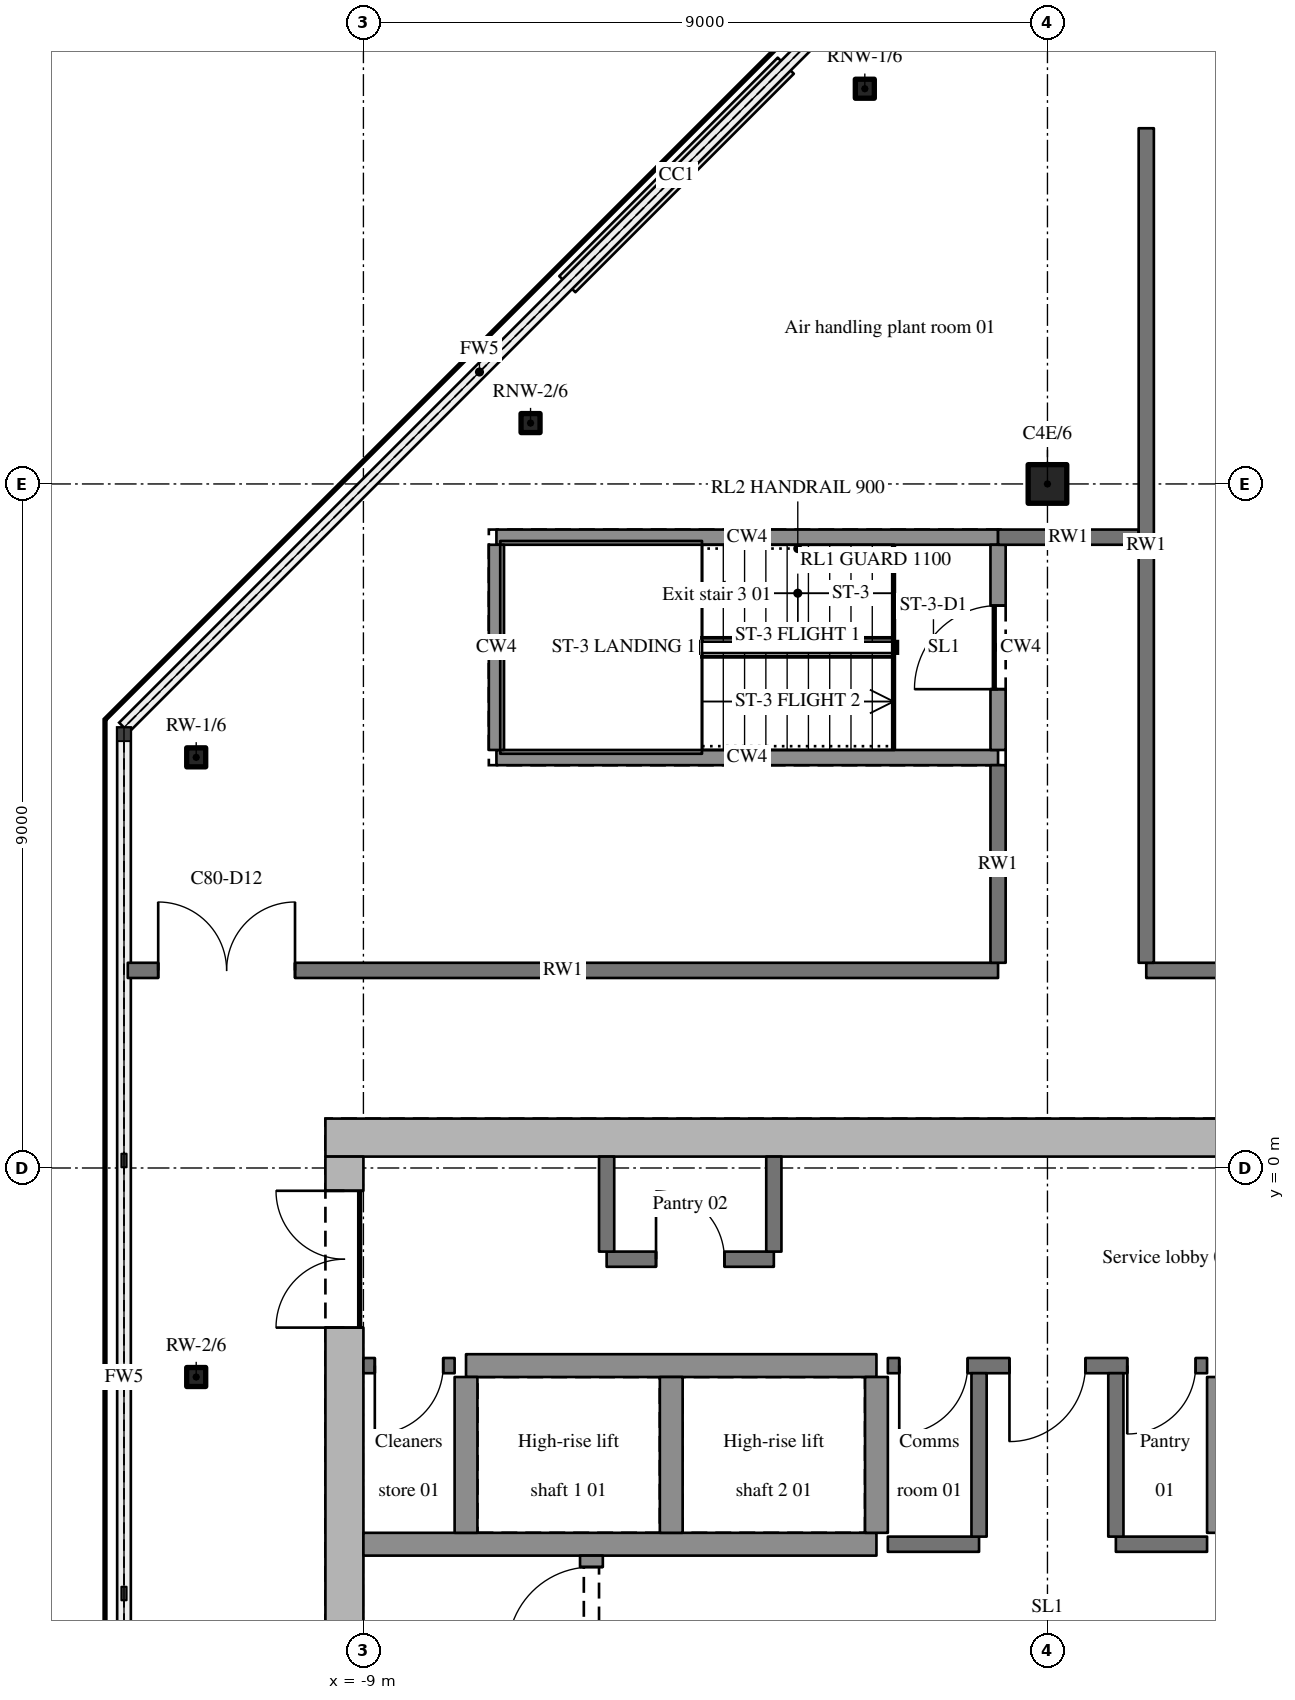
"""IFC4 building model, lengths in metres.
Left out: names, types, materials, properties, quantities, classifications, styles, units other than length and angle.
Written with IfcOpenShell. Run it as: python <this file> out.ifc"""

import sys

from ifc_helpers import new_model, si_unit, direction, frame, frame_2d, origin, origin_2d, place, context, subcontext, project, spatial, polyline, rectangle, hollow_rectangle, hollow_circle, outline, extrude, element, fill, save


model = new_model("IFC4")
c1 = context("Model", 3, precision=1e-05, world=origin(), true_north=direction((0.0, 1.0)))
c2 = subcontext(c1, "Body", "Model", "MODEL_VIEW")
j1 = project(units=[si_unit("LENGTHUNIT", "METRE"), si_unit("PLANEANGLEUNIT", "RADIAN")], contexts=[c1])
p1 = place(None, origin())
s1 = spatial("IfcSite", under=j1, at=p1, CompositionType="ELEMENT")
p2 = place(p1, origin())
s2 = spatial("IfcBuilding", under=s1, at=p2, CompositionType="ELEMENT")
p3 = place(p2, frame((0.0, 0.0, 297.3)))
s3 = spatial("IfcBuildingStorey", under=s2, at=p3, CompositionType="ELEMENT", Elevation=297.3)
p4 = place(p3, frame((0.0, 9.0, 0.0), z_axis=(0.0, 0.0, 1.0), x_axis=(1.0, 0.0, 0.0)))
e1 = element("IfcColumn", 1, at=p4, inside=s3, PredefinedType="COLUMN", context=c2, shape_type="SweptSolid", body=[
    extrude(hollow_circle(Radius=0.254, WallThickness=0.025, at=origin_2d()), origin(), (0.0, 0.0, 1.0), 3.6),
])
p5 = place(p3, frame((-2.403, 14.2, 0.0), z_axis=(0.0, 0.0, 1.0), x_axis=(1.0, 0.0, 0.0)))
e2 = element("IfcColumn", 2, at=p5, inside=s3, PredefinedType="COLUMN", context=c2, shape_type="SweptSolid", body=[
    extrude(hollow_rectangle(XDim=0.25, YDim=0.25, WallThickness=0.02, InnerFilletRadius=0.03, OuterFilletRadius=0.05, at=origin_2d()), origin(), (0.0, 0.0, 1.0), 3.114),
])
for number, where, z_axis, x_axis in (
    (3, (-6.801, 9.801, 0.0), (0.0, 0.0, 1.0), (1.0, 0.0, 0.0)),
    (4, (-11.2, 5.403, 0.0), (0.0, 0.0, 1.0), (1.0, 0.0, 0.0)),
    (5, (-11.2, -2.75, 0.0), (0.0, 0.0, 1.0), (1.0, 0.0, 0.0)),
):
    element("IfcColumn", number, at=place(p3, frame(where, z_axis=z_axis, x_axis=x_axis)), inside=s3, PredefinedType="COLUMN", context=c2, shape_type="SweptSolid", body=[
        extrude(hollow_rectangle(XDim=0.25, YDim=0.25, WallThickness=0.02, InnerFilletRadius=0.03, OuterFilletRadius=0.05, at=origin_2d()), origin(), (0.0, 0.0, 1.0), 3.6),
    ])
p6 = place(p3, frame((-9.5, 0.4, 0.0), z_axis=(0.0, 0.0, 1.0), x_axis=(1.0, 0.0, 0.0)))
e6 = element("IfcWall", 6, at=p6, inside=s3, PredefinedType="SHEAR", context=c2, shape_type="SweptSolid", body=[
    extrude(outline(polyline([(0.0, 0.0), (19.0, 0.0), (19.0, 3.6), (0.0, 3.6), (0.0, 0.0)])), frame((0.0, 0.25, 0.0), z_axis=(0.0, -1.0, 0.0), x_axis=(1.0, 0.0, 0.0)), (0.0, 0.0, 1.0), 0.5),
])
p7 = place(p3, frame((-9.25, -11.5, 0.0), z_axis=(0.0, 0.0, 1.0), x_axis=(0.0, 1.0, 0.0)))
e7 = element("IfcWall", 7, at=p7, inside=s3, PredefinedType="SHEAR", context=c2, shape_type="SweptSolid", body=[
    extrude(outline(polyline([(0.0, 0.0), (11.65, 0.0), (11.65, 3.6), (0.0, 3.6), (0.0, 0.0)])), frame((0.0, 0.25, 0.0), z_axis=(0.0, -1.0, 0.0), x_axis=(1.0, 0.0, 0.0)), (0.0, 0.0, 1.0), 0.5),
])
p8 = place(p7, frame((9.4, 0.0, 0.0)))
e8 = element("IfcOpeningElement", 8, at=p8, cuts=e7, PredefinedType="OPENING", context=c2, shape_type="SweptSolid", body=[
    extrude(rectangle(XDim=1.8, YDim=2.1, at=frame_2d((0.9, 1.05))), frame((0.0, 0.26, 0.0), z_axis=(0.0, -1.0, 0.0), x_axis=(1.0, 0.0, 0.0)), (0.0, 0.0, 1.0), 0.52),
])
p9 = place(p3, frame((-9.0, -4.95, 0.0), z_axis=(0.0, 0.0, 1.0), x_axis=(1.0, 0.0, 0.0)))
e9 = element("IfcWall", 9, at=p9, inside=s3, PredefinedType="SHEAR", context=c2, shape_type="SweptSolid", body=[
    extrude(rectangle(XDim=6.75, YDim=0.3, at=frame_2d((3.375, 0.0))), origin(), (0.0, 0.0, 1.0), 3.6),
])
for number, where, z_axis, x_axis in (
    (10, (-2.1, -4.95, 0.0), (0.0, 0.0, 1.0), (1.0, 0.0, 0.0)),
    (11, (0.9, -4.95, 0.0), (0.0, 0.0, 1.0), (1.0, 0.0, 0.0)),
):
    element("IfcWall", number, at=place(p3, frame(where, z_axis=z_axis, x_axis=x_axis)), inside=s3, PredefinedType="SOLIDWALL", context=c2, shape_type="SweptSolid", body=[
        extrude(rectangle(XDim=1.2, YDim=0.2, at=frame_2d((0.6, 0.0))), origin(), (0.0, 0.0, 1.0), 3.3),
    ])
p10 = place(p3, frame((-7.8, -2.6, 0.0), z_axis=(0.0, 0.0, 1.0), x_axis=(-1.0, 0.0, 0.0)))
e12 = element("IfcWall", 12, at=p10, inside=s3, PredefinedType="SOLIDWALL", context=c2, shape_type="SweptSolid", body=[
    extrude(rectangle(XDim=1.2, YDim=0.2, at=frame_2d((0.6, 0.0))), origin(), (0.0, 0.0, 1.0), 3.3),
])
p11 = place(p10, frame((0.15, 0.0, 0.0)))
e13 = element("IfcOpeningElement", 13, at=p11, cuts=e12, PredefinedType="OPENING", context=c2, shape_type="SweptSolid", body=[
    extrude(rectangle(XDim=0.9, YDim=2.1, at=frame_2d((0.45, 1.05))), frame((0.0, 0.11, 0.0), z_axis=(0.0, -1.0, 0.0), x_axis=(1.0, 0.0, 0.0)), (0.0, 0.0, 1.0), 0.22),
])
p12 = place(p3, frame((-7.65, -2.6, 0.0), z_axis=(0.0, 0.0, 1.0), x_axis=(1.0, 0.0, 0.0)))
e14 = element("IfcWall", 14, at=p12, inside=s3, PredefinedType="SHEAR", context=c2, shape_type="SweptSolid", body=[
    extrude(rectangle(XDim=5.4, YDim=0.3, at=frame_2d((2.7, 0.0))), origin(), (0.0, 0.0, 1.0), 3.6),
])
p13 = place(p3, frame((2.1, -2.6, 0.0), z_axis=(0.0, 0.0, 1.0), x_axis=(-1.0, 0.0, 0.0)))
e15 = element("IfcWall", 15, at=p13, inside=s3, PredefinedType="SOLIDWALL", context=c2, shape_type="SweptSolid", body=[
    extrude(rectangle(XDim=4.2, YDim=0.2, at=frame_2d((2.1, 0.0))), origin(), (0.0, 0.0, 1.0), 3.3),
])
p14 = place(p13, frame((1.6, 0.0, 0.0)))
e16 = element("IfcOpeningElement", 16, at=p14, cuts=e15, PredefinedType="OPENING", context=c2, shape_type="SweptSolid", body=[
    extrude(rectangle(XDim=1.0, YDim=2.1, at=frame_2d((0.5, 1.05))), frame((0.0, 0.11, 0.0), z_axis=(0.0, -1.0, 0.0), x_axis=(1.0, 0.0, 0.0)), (0.0, 0.0, 1.0), 0.22),
])
p15 = place(p13, frame((3.15, 0.0, 0.0)))
e17 = element("IfcOpeningElement", 17, at=p15, cuts=e15, PredefinedType="OPENING", context=c2, shape_type="SweptSolid", body=[
    extrude(rectangle(XDim=0.9, YDim=2.1, at=frame_2d((0.45, 1.05))), frame((0.0, 0.11, 0.0), z_axis=(0.0, -1.0, 0.0), x_axis=(1.0, 0.0, 0.0)), (0.0, 0.0, 1.0), 0.22),
])
p16 = place(p13, frame((0.15, 0.0, 0.0)))
e18 = element("IfcOpeningElement", 18, at=p16, cuts=e15, PredefinedType="OPENING", context=c2, shape_type="SweptSolid", body=[
    extrude(rectangle(XDim=0.9, YDim=2.1, at=frame_2d((0.45, 1.05))), frame((0.0, 0.11, 0.0), z_axis=(0.0, -1.0, 0.0), x_axis=(1.0, 0.0, 0.0)), (0.0, 0.0, 1.0), 0.22),
])
p17 = place(p3, frame((-5.8, -1.2, 0.0), z_axis=(0.0, 0.0, 1.0), x_axis=(1.0, 0.0, 0.0)))
e19 = element("IfcWall", 19, at=p17, inside=s3, PredefinedType="SOLIDWALL", context=c2, shape_type="SweptSolid", body=[
    extrude(rectangle(XDim=2.2, YDim=0.2, at=frame_2d((1.1, 0.0))), origin(), (0.0, 0.0, 1.0), 3.3),
])
p18 = place(p17, frame((0.65, 0.0, 0.0)))
e20 = element("IfcOpeningElement", 20, at=p18, cuts=e19, PredefinedType="OPENING", context=c2, shape_type="SweptSolid", body=[
    extrude(rectangle(XDim=0.9, YDim=2.1, at=frame_2d((0.45, 1.05))), frame((0.0, 0.11, 0.0), z_axis=(0.0, -1.0, 0.0), x_axis=(1.0, 0.0, 0.0)), (0.0, 0.0, 1.0), 0.22),
])
p19 = place(p3, frame((-12.1, 2.6, 0.0), z_axis=(0.0, 0.0, 1.0), x_axis=(1.0, 0.0, 0.0)))
e21 = element("IfcWall", 21, at=p19, inside=s3, PredefinedType="SOLIDWALL", context=c2, shape_type="SweptSolid", body=[
    extrude(rectangle(XDim=11.45, YDim=0.2, at=frame_2d((5.725, 0.0))), origin(), (0.0, 0.0, 1.0), 2.66),
])
p20 = place(p19, frame((0.4, 0.0, 0.0)))
e22 = element("IfcOpeningElement", 22, at=p20, cuts=e21, PredefinedType="OPENING", context=c2, shape_type="SweptSolid", body=[
    extrude(rectangle(XDim=1.8, YDim=2.1, at=frame_2d((0.9, 1.05))), frame((0.0, 0.11, 0.0), z_axis=(0.0, -1.0, 0.0), x_axis=(1.0, 0.0, 0.0)), (0.0, 0.0, 1.0), 0.22),
])
p21 = place(p3, frame((1.3, 2.6, 0.0), z_axis=(0.0, 0.0, 1.0), x_axis=(1.0, 0.0, 0.0)))
e23 = element("IfcWall", 23, at=p21, inside=s3, PredefinedType="SOLIDWALL", context=c2, shape_type="SweptSolid", body=[
    extrude(rectangle(XDim=16.8, YDim=0.2, at=frame_2d((8.4, 0.0))), origin(), (0.0, 0.0, 1.0), 2.66),
])
p22 = place(p21, frame((1.9, 0.0, 0.0)))
e24 = element("IfcOpeningElement", 24, at=p22, cuts=e23, PredefinedType="OPENING", context=c2, shape_type="SweptSolid", body=[
    extrude(rectangle(XDim=0.9, YDim=2.1, at=frame_2d((0.45, 1.05))), frame((0.0, 0.11, 0.0), z_axis=(0.0, -1.0, 0.0), x_axis=(1.0, 0.0, 0.0)), (0.0, 0.0, 1.0), 0.22),
])
p23 = place(p21, frame((6.0, 0.0, 0.0)))
e25 = element("IfcOpeningElement", 25, at=p23, cuts=e23, PredefinedType="OPENING", context=c2, shape_type="SweptSolid", body=[
    extrude(rectangle(XDim=0.9, YDim=2.1, at=frame_2d((0.45, 1.05))), frame((0.0, 0.11, 0.0), z_axis=(0.0, -1.0, 0.0), x_axis=(1.0, 0.0, 0.0)), (0.0, 0.0, 1.0), 0.22),
])
p24 = place(p21, frame((13.025, 0.0, 0.0)))
e26 = element("IfcOpeningElement", 26, at=p24, cuts=e23, PredefinedType="OPENING", context=c2, shape_type="SweptSolid", body=[
    extrude(rectangle(XDim=0.9, YDim=2.1, at=frame_2d((0.45, 1.05))), frame((0.0, 0.11, 0.0), z_axis=(0.0, -1.0, 0.0), x_axis=(1.0, 0.0, 0.0)), (0.0, 0.0, 1.0), 0.22),
])
for number, where, z_axis, x_axis in (
    (27, (-7.25, 5.4, 0.0), (0.0, 0.0, 1.0), (1.0, 0.0, 0.0)),
    (28, (-7.25, 8.3, 0.0), (0.0, 0.0, 1.0), (1.0, 0.0, 0.0)),
):
    element("IfcWall", number, at=place(p3, frame(where, z_axis=z_axis, x_axis=x_axis)), inside=s3, PredefinedType="SHEAR", context=c2, shape_type="SweptSolid", body=[
        extrude(rectangle(XDim=6.6, YDim=0.2, at=frame_2d((3.3, 0.0))), origin(), (0.0, 0.0, 1.0), 3.6),
    ])
p25 = place(p3, frame((-0.65, 8.3, 0.0), z_axis=(0.0, 0.0, 1.0), x_axis=(1.0, 0.0, 0.0)))
e29 = element("IfcWall", 29, at=p25, inside=s3, PredefinedType="SOLIDWALL", context=c2, shape_type="SweptSolid", body=[
    extrude(rectangle(XDim=1.85, YDim=0.2, at=frame_2d((0.925, 0.0))), origin(), (0.0, 0.0, 1.0), 2.66),
])
p26 = place(p3, frame((-7.65, -4.8, 0.0), z_axis=(0.0, 0.0, 1.0), x_axis=(0.0, 1.0, 0.0)))
e30 = element("IfcWall", 30, at=p26, inside=s3, PredefinedType="SHEAR", context=c2, shape_type="SweptSolid", body=[
    extrude(rectangle(XDim=2.05, YDim=0.3, at=frame_2d((1.025, 0.0))), origin(), (0.0, 0.0, 1.0), 3.6),
])
p27 = place(p3, frame((-7.25, 5.5, 0.0), z_axis=(0.0, 0.0, 1.0), x_axis=(0.0, 1.0, 0.0)))
e31 = element("IfcWall", 31, at=p27, inside=s3, PredefinedType="SHEAR", context=c2, shape_type="SweptSolid", body=[
    extrude(rectangle(XDim=2.7, YDim=0.2, at=frame_2d((1.35, 0.0))), origin(), (0.0, 0.0, 1.0), 3.6),
])
p28 = place(p3, frame((-6.0, -11.5, 0.0), z_axis=(0.0, 0.0, 1.0), x_axis=(0.0, 1.0, 0.0)))
e32 = element("IfcWall", 32, at=p28, inside=s3, PredefinedType="SHEAR", context=c2, shape_type="SweptSolid", body=[
    extrude(rectangle(XDim=6.4, YDim=0.3, at=frame_2d((3.2, 0.0))), origin(), (0.0, 0.0, 1.0), 3.6),
])
p29 = place(p28, frame((5.15, 0.0, 0.0)))
e33 = element("IfcOpeningElement", 33, at=p29, cuts=e32, PredefinedType="OPENING", context=c2, shape_type="SweptSolid", body=[
    extrude(rectangle(XDim=1.1, YDim=2.1, at=frame_2d((0.55, 1.05))), frame((0.0, 0.16, 0.0), z_axis=(0.0, -1.0, 0.0), x_axis=(1.0, 0.0, 0.0)), (0.0, 0.0, 1.0), 0.32),
])
p30 = place(p3, frame((-5.8, -1.1, 0.0), z_axis=(0.0, 0.0, 1.0), x_axis=(0.0, 1.0, 0.0)))
e34 = element("IfcWall", 34, at=p30, inside=s3, PredefinedType="SOLIDWALL", context=c2, shape_type="SweptSolid", body=[
    extrude(rectangle(XDim=1.25, YDim=0.2, at=frame_2d((0.625, 0.0))), origin(), (0.0, 0.0, 1.0), 3.3),
])
p31 = place(p3, frame((-4.95, -4.8, 0.0), z_axis=(0.0, 0.0, 1.0), x_axis=(0.0, 1.0, 0.0)))
e35 = element("IfcWall", 35, at=p31, inside=s3, PredefinedType="SHEAR", context=c2, shape_type="SweptSolid", body=[
    extrude(rectangle(XDim=2.05, YDim=0.3, at=frame_2d((1.025, 0.0))), origin(), (0.0, 0.0, 1.0), 3.6),
])
p32 = place(p3, frame((-3.6, -1.1, 0.0), z_axis=(0.0, 0.0, 1.0), x_axis=(0.0, 1.0, 0.0)))
e36 = element("IfcWall", 36, at=p32, inside=s3, PredefinedType="SOLIDWALL", context=c2, shape_type="SweptSolid", body=[
    extrude(rectangle(XDim=1.25, YDim=0.2, at=frame_2d((0.625, 0.0))), origin(), (0.0, 0.0, 1.0), 3.3),
])
p33 = place(p3, frame((-2.25, -4.8, 0.0), z_axis=(0.0, 0.0, 1.0), x_axis=(0.0, 1.0, 0.0)))
e37 = element("IfcWall", 37, at=p33, inside=s3, PredefinedType="SHEAR", context=c2, shape_type="SweptSolid", body=[
    extrude(rectangle(XDim=2.05, YDim=0.3, at=frame_2d((1.025, 0.0))), origin(), (0.0, 0.0, 1.0), 3.6),
])
p34 = place(p3, frame((-0.9, -4.85, 0.0), z_axis=(0.0, 0.0, 1.0), x_axis=(0.0, 1.0, 0.0)))
e38 = element("IfcWall", 38, at=p34, inside=s3, PredefinedType="SOLIDWALL", context=c2, shape_type="SweptSolid", body=[
    extrude(rectangle(XDim=2.15, YDim=0.2, at=frame_2d((1.075, 0.0))), origin(), (0.0, 0.0, 1.0), 3.3),
])
p35 = place(p3, frame((-0.65, 2.7, 0.0), z_axis=(0.0, 0.0, 1.0), x_axis=(0.0, 1.0, 0.0)))
e39 = element("IfcWall", 39, at=p35, inside=s3, PredefinedType="SOLIDWALL", context=c2, shape_type="SweptSolid", body=[
    extrude(rectangle(XDim=2.6, YDim=0.2, at=frame_2d((1.3, 0.0))), origin(), (0.0, 0.0, 1.0), 2.66),
])
p36 = place(p3, frame((-0.65, 5.5, 0.0), z_axis=(0.0, 0.0, 1.0), x_axis=(0.0, 1.0, 0.0)))
e40 = element("IfcWall", 40, at=p36, inside=s3, PredefinedType="SHEAR", context=c2, shape_type="SweptSolid", body=[
    extrude(rectangle(XDim=2.7, YDim=0.2, at=frame_2d((1.35, 0.0))), origin(), (0.0, 0.0, 1.0), 3.6),
])
p37 = place(p36, frame((0.8, 0.0, 0.0)))
e41 = element("IfcOpeningElement", 41, at=p37, cuts=e40, PredefinedType="OPENING", context=c2, shape_type="SweptSolid", body=[
    extrude(rectangle(XDim=1.1, YDim=2.1, at=frame_2d((0.55, 1.05))), frame((0.0, 0.11, 0.0), z_axis=(0.0, -1.0, 0.0), x_axis=(1.0, 0.0, 0.0)), (0.0, 0.0, 1.0), 0.22),
])
p38 = place(p3, frame((0.9, -4.85, 0.0), z_axis=(0.0, 0.0, 1.0), x_axis=(0.0, 1.0, 0.0)))
e42 = element("IfcWall", 42, at=p38, inside=s3, PredefinedType="SOLIDWALL", context=c2, shape_type="SweptSolid", body=[
    extrude(rectangle(XDim=2.15, YDim=0.2, at=frame_2d((1.075, 0.0))), origin(), (0.0, 0.0, 1.0), 3.3),
])
p39 = place(p3, frame((1.3, 2.7, 0.0), z_axis=(0.0, 0.0, 1.0), x_axis=(0.0, 1.0, 0.0)))
e43 = element("IfcWall", 43, at=p39, inside=s3, PredefinedType="SOLIDWALL", context=c2, shape_type="SweptSolid", body=[
    extrude(rectangle(XDim=10.98, YDim=0.2, at=frame_2d((5.49, 0.0))), origin(), (0.0, 0.0, 1.0), 2.66),
])
p40 = place(p3, frame((2.25, -4.8, 0.0), z_axis=(0.0, 0.0, 1.0), x_axis=(0.0, 1.0, 0.0)))
e44 = element("IfcWall", 44, at=p40, inside=s3, PredefinedType="SHEAR", context=c2, shape_type="SweptSolid", body=[
    extrude(rectangle(XDim=2.05, YDim=0.3, at=frame_2d((1.025, 0.0))), origin(), (0.0, 0.0, 1.0), 3.6),
])
p41 = place(p8, origin())
e45 = element("IfcDoor", 45, at=p41, inside=s3, OperationType="DOUBLE_DOOR_SINGLE_SWING", PredefinedType="DOOR", context=c2, shape_type="SweptSolid", body=[
    extrude(rectangle(XDim=1.8, YDim=2.1, at=frame_2d((0.9, 1.05))), frame((0.0, 0.025, 0.0), z_axis=(0.0, -1.0, 0.0), x_axis=(1.0, 0.0, 0.0)), (0.0, 0.0, 1.0), 0.05),
])
fill(e8, e45)
p42 = place(p14, origin())
e46 = element("IfcDoor", 46, at=p42, inside=s3, OperationType="SINGLE_SWING_RIGHT", PredefinedType="DOOR", context=c2, shape_type="SweptSolid", body=[
    extrude(rectangle(XDim=1.0, YDim=2.1, at=frame_2d((0.5, 1.05))), frame((0.0, 0.025, 0.0), z_axis=(0.0, -1.0, 0.0), x_axis=(1.0, 0.0, 0.0)), (0.0, 0.0, 1.0), 0.05),
])
fill(e16, e46)
p43 = place(p29, origin())
e47 = element("IfcDoor", 47, at=p43, inside=s3, OperationType="SINGLE_SWING_LEFT", PredefinedType="DOOR", context=c2, shape_type="SweptSolid", body=[
    extrude(rectangle(XDim=1.1, YDim=2.1, at=frame_2d((0.55, 1.05))), frame((0.0, 0.025, 0.0), z_axis=(0.0, -1.0, 0.0), x_axis=(1.0, 0.0, 0.0)), (0.0, 0.0, 1.0), 0.05),
])
fill(e33, e47)
p44 = place(p37, origin())
e48 = element("IfcDoor", 48, at=p44, inside=s3, OperationType="SINGLE_SWING_LEFT", PredefinedType="DOOR", context=c2, shape_type="SweptSolid", body=[
    extrude(rectangle(XDim=1.1, YDim=2.1, at=frame_2d((0.55, 1.05))), frame((0.0, 0.025, 0.0), z_axis=(0.0, -1.0, 0.0), x_axis=(1.0, 0.0, 0.0)), (0.0, 0.0, 1.0), 0.05),
])
fill(e41, e48)
p45 = place(p15, origin())
e49 = element("IfcDoor", 49, at=p45, inside=s3, OperationType="SINGLE_SWING_RIGHT", PredefinedType="DOOR", context=c2, shape_type="SweptSolid", body=[
    extrude(rectangle(XDim=0.9, YDim=2.1, at=frame_2d((0.45, 1.05))), frame((0.0, 0.025, 0.0), z_axis=(0.0, -1.0, 0.0), x_axis=(1.0, 0.0, 0.0)), (0.0, 0.0, 1.0), 0.05),
])
fill(e17, e49)
p46 = place(p16, origin())
e50 = element("IfcDoor", 50, at=p46, inside=s3, OperationType="SINGLE_SWING_RIGHT", PredefinedType="DOOR", context=c2, shape_type="SweptSolid", body=[
    extrude(rectangle(XDim=0.9, YDim=2.1, at=frame_2d((0.45, 1.05))), frame((0.0, 0.025, 0.0), z_axis=(0.0, -1.0, 0.0), x_axis=(1.0, 0.0, 0.0)), (0.0, 0.0, 1.0), 0.05),
])
fill(e18, e50)
p47 = place(p11, origin())
e51 = element("IfcDoor", 51, at=p47, inside=s3, OperationType="SINGLE_SWING_RIGHT", PredefinedType="DOOR", context=c2, shape_type="SweptSolid", body=[
    extrude(rectangle(XDim=0.9, YDim=2.1, at=frame_2d((0.45, 1.05))), frame((0.0, 0.025, 0.0), z_axis=(0.0, -1.0, 0.0), x_axis=(1.0, 0.0, 0.0)), (0.0, 0.0, 1.0), 0.05),
])
fill(e13, e51)
p48 = place(p20, origin())
e52 = element("IfcDoor", 52, at=p48, inside=s3, OperationType="DOUBLE_DOOR_SINGLE_SWING", PredefinedType="DOOR", context=c2, shape_type="SweptSolid", body=[
    extrude(rectangle(XDim=1.8, YDim=2.1, at=frame_2d((0.9, 1.05))), frame((0.0, 0.025, 0.0), z_axis=(0.0, -1.0, 0.0), x_axis=(1.0, 0.0, 0.0)), (0.0, 0.0, 1.0), 0.05),
])
fill(e22, e52)
p49 = place(p18, origin())
e53 = element("IfcDoor", 53, at=p49, inside=s3, OperationType="SINGLE_SWING_LEFT", PredefinedType="DOOR", context=c2, shape_type="SweptSolid", body=[
    extrude(rectangle(XDim=0.9, YDim=2.1, at=frame_2d((0.45, 1.05))), frame((0.0, 0.025, 0.0), z_axis=(0.0, -1.0, 0.0), x_axis=(1.0, 0.0, 0.0)), (0.0, 0.0, 1.0), 0.05),
])
fill(e20, e53)
save(model, sys.argv[1])
